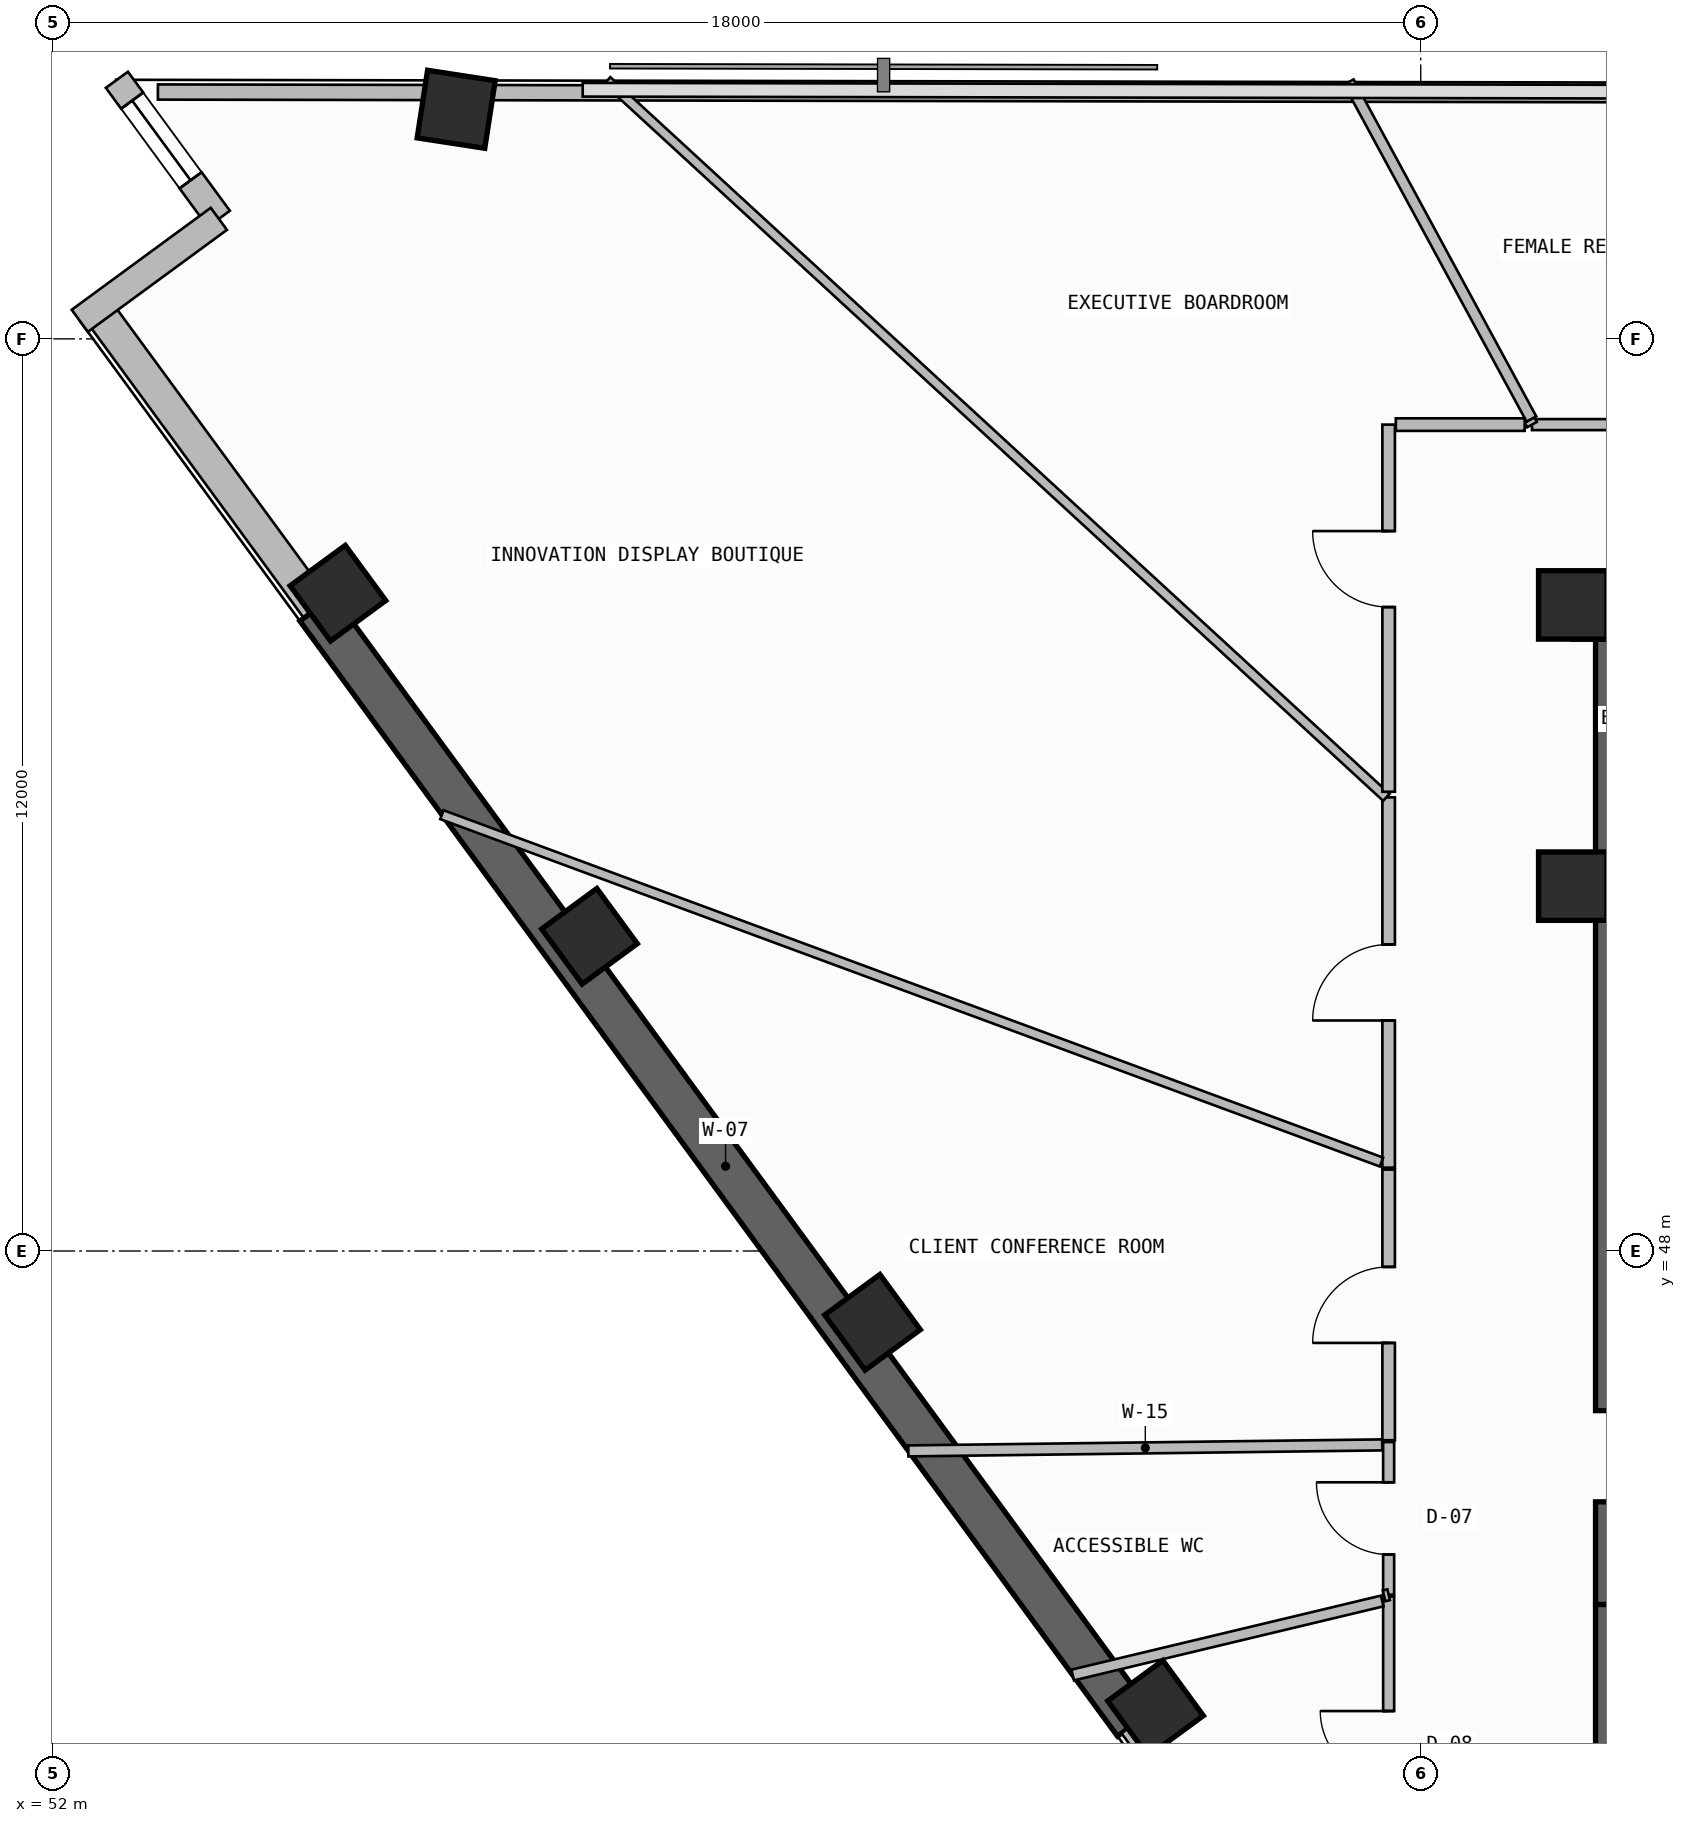
"""IFC4 building model, lengths in metres.
Left out: names, types, materials, properties, quantities, classifications, styles, units other than length and angle.
Written with IfcOpenShell. Run it as: python <this file> out.ifc"""

import sys

from ifc_helpers import new_model, si_unit, direction, frame, frame_2d, origin, origin_2d, place, context, subcontext, project, spatial, rectangle, extrude, element, fill, save


model = new_model("IFC4")
c1 = context("Model", 3, precision=1e-05, world=origin(), true_north=direction((0.0, 1.0)))
c2 = subcontext(c1, "Body", "Model", "MODEL_VIEW")
j1 = project(units=[si_unit("LENGTHUNIT", "METRE"), si_unit("PLANEANGLEUNIT", "RADIAN")], contexts=[c1])
p1 = place(None, origin())
s1 = spatial("IfcSite", under=j1, at=p1, CompositionType="ELEMENT")
p2 = place(p1, origin())
s2 = spatial("IfcBuilding", under=s1, at=p2, CompositionType="ELEMENT")
p3 = place(p2, frame((0.0, 0.0, 239.62)))
s3 = spatial("IfcBuildingStorey", under=s2, at=p3, CompositionType="ELEMENT", Elevation=239.62)
p4 = place(p3, frame((72.6, 35.5, -0.26), z_axis=(0.0, 0.0, 1.0), x_axis=(0.0, 1.0, 0.0)))
e1 = element("IfcWall", 1, at=p4, inside=s3, PredefinedType="SHEAR", context=c2, shape_type="SweptSolid", body=[
    extrude(rectangle(XDim=7.85, YDim=0.6, at=frame_2d((3.925, 0.0))), origin(), (0.0, 0.0, 1.0), 3.52),
])
p5 = place(p4, frame((1.45, 0.0, 0.26)))
e2 = element("IfcOpeningElement", 2, at=p5, cuts=e1, PredefinedType="OPENING", context=c2, shape_type="SweptSolid", body=[
    extrude(rectangle(XDim=1.2, YDim=2.2, at=frame_2d((0.6, 1.1))), frame((0.0, 0.31, 0.0), z_axis=(0.0, -1.0, 0.0), x_axis=(1.0, 0.0, 0.0)), (0.0, 0.0, 1.0), 0.62),
])
p6 = place(p3, frame((72.6, 43.35, -0.26), z_axis=(0.0, 0.0, 1.0), x_axis=(0.0, 1.0, 0.0)))
e3 = element("IfcWall", 3, at=p6, inside=s3, PredefinedType="SHEAR", context=c2, shape_type="SweptSolid", body=[
    extrude(rectangle(XDim=12.7, YDim=0.6, at=frame_2d((6.35, 0.0))), origin(), (0.0, 0.0, 1.0), 3.52),
])
p7 = place(p6, frame((1.35, 0.0, 0.26)))
e4 = element("IfcOpeningElement", 4, at=p7, cuts=e3, PredefinedType="OPENING", context=c2, shape_type="SweptSolid", body=[
    extrude(rectangle(XDim=1.2, YDim=2.2, at=frame_2d((0.6, 1.1))), frame((0.0, 0.31, 0.0), z_axis=(0.0, -1.0, 0.0), x_axis=(1.0, 0.0, 0.0)), (0.0, 0.0, 1.0), 0.62),
])
p8 = place(p3, frame((72.0, 56.35, -0.26), z_axis=(0.0, 0.0, 1.0), x_axis=(1.0, 0.0, 0.0)))
e5 = element("IfcWall", 5, at=p8, inside=s3, PredefinedType="SHEAR", context=c2, shape_type="SweptSolid", body=[
    extrude(rectangle(XDim=13.6, YDim=0.6, at=frame_2d((6.8, 0.0))), origin(), (0.0, 0.0, 1.0), 3.52),
])
for number, where, z_axis, x_axis in (
    (6, (72.0, 52.8, 0.0), (0.0, 0.0, 1.0), (1.0, 0.0, 0.0)),
    (7, (72.0, 56.5, 0.0), (0.0, 0.0, 1.0), (1.0, 0.0, 0.0)),
    (8, (57.309, 63.021, 0.0), (0.0, 0.0, 1.0), (0.152, 0.988, 0.0)),
    (9, (55.753, 56.654, 0.0), (0.0, 0.0, 1.0), (-0.591, 0.806, 0.0)),
    (10, (59.063, 52.14, 0.0), (0.0, 0.0, 1.0), (-0.591, 0.806, 0.0)),
    (11, (62.787, 47.062, 0.0), (0.0, 0.0, 1.0), (-0.591, 0.806, 0.0)),
    (12, (66.51, 41.983, 0.0), (0.0, 0.0, 1.0), (-0.591, 0.806, 0.0)),
):
    element("IfcColumn", number, at=place(p3, frame(where, z_axis=z_axis, x_axis=x_axis)), inside=s3, PredefinedType="COLUMN", context=c2, shape_type="SweptSolid", body=[
        extrude(rectangle(XDim=0.9, YDim=0.9, at=origin_2d()), origin(), (0.0, 0.0, 1.0), 3.52),
    ])
p9 = place(p3, frame((52.579, 60.4, 0.0), z_axis=(0.0, 0.0, 1.0), x_axis=(0.591311800505, -0.806443026248, 0.0)))
e13 = element("IfcWall", 13, at=p9, inside=s3, PredefinedType="SOLIDWALL", context=c2, shape_type="SweptSolid", body=[
    extrude(rectangle(XDim=4.898, YDim=0.42, at=frame_2d((2.449, 0.0))), origin(), (0.0, 0.0, 1.0), 2.645),
])
p10 = place(p3, frame((55.475, 56.45, -0.26), z_axis=(0.0, 0.0, 1.0), x_axis=(0.591309555876, -0.806444672082, 0.0)))
e14 = element("IfcWall", 14, at=p10, inside=s3, PredefinedType="SHEAR", context=c2, shape_type="SweptSolid", body=[
    extrude(rectangle(XDim=18.192, YDim=0.55, at=frame_2d((9.096, 0.0))), origin(), (0.0, 0.0, 1.0), 3.52),
])
p11 = place(p3, frame((66.232, 41.779, 0.0), z_axis=(0.0, 0.0, 1.0), x_axis=(0.591309008949, -0.806445073105, 0.0)))
e15 = element("IfcWall", 15, at=p11, inside=s3, PredefinedType="SOLIDWALL", context=c2, shape_type="SweptSolid", body=[
    extrude(rectangle(XDim=8.908, YDim=0.42, at=frame_2d((4.454, 0.0))), origin(), (0.0, 0.0, 1.0), 2.645),
])
p12 = place(p11, frame((2.149, 0.0, 1.1)))
e16 = element("IfcOpeningElement", 16, at=p12, cuts=e15, PredefinedType="OPENING", context=c2, shape_type="SweptSolid", body=[
    extrude(rectangle(XDim=2.4, YDim=1.2, at=frame_2d((1.2, 0.6))), frame((0.0, 0.22, 0.0), z_axis=(0.0, -1.0, 0.0), x_axis=(1.0, 0.0, 0.0)), (0.0, 0.0, 1.0), 0.44),
])
p13 = place(p3, frame((52.845, 63.409, 0.0), z_axis=(0.0, 0.0, 1.0), x_axis=(0.591251685745, -0.806487101015, 0.0)))
e17 = element("IfcWall", 17, at=p13, inside=s3, PredefinedType="SOLIDWALL", context=c2, shape_type="SweptSolid", body=[
    extrude(rectangle(XDim=2.269, YDim=0.36, at=frame_2d((1.134, 0.0))), origin(), (0.0, 0.0, 1.0), 3.26),
])
p14 = place(p13, frame((0.34, 0.0, 0.45)))
e18 = element("IfcOpeningElement", 18, at=p14, cuts=e17, PredefinedType="OPENING", context=c2, shape_type="SweptSolid", body=[
    extrude(rectangle(XDim=1.3, YDim=2.4, at=frame_2d((0.65, 1.2))), frame((0.0, 0.19, 0.0), z_axis=(0.0, -1.0, 0.0), x_axis=(1.0, 0.0, 0.0)), (0.0, 0.0, 1.0), 0.38),
])
p15 = place(p3, frame((54.187, 61.579, 0.0), z_axis=(0.0, 0.0, 1.0), x_axis=(-0.806449475274, -0.591303005092, 0.0)))
e19 = element("IfcWall", 19, at=p15, inside=s3, PredefinedType="SOLIDWALL", context=c2, shape_type="SweptSolid", body=[
    extrude(rectangle(XDim=2.268, YDim=0.36, at=frame_2d((1.134, 0.0))), origin(), (0.0, 0.0, 1.0), 3.26),
])
p16 = place(p3, frame((83.332, 63.193, 0.0), z_axis=(0.0, 0.0, 1.0), x_axis=(-0.999998363757, 0.001809000383, 0.0)))
e20 = element("IfcWall", 20, at=p16, inside=s3, PredefinedType="PARAPET", context=c2, shape_type="SweptSolid", body=[
    extrude(rectangle(XDim=25.777, YDim=0.2, at=frame_2d((12.889, 0.0))), origin(), (0.0, 0.0, 1.0), 1.15),
])
p17 = place(p3, frame((57.064, 63.241, 0.0), z_axis=(0.0, 0.0, 1.0), x_axis=(-0.999998274159, 0.001857869529, 0.0)))
e21 = element("IfcWall", 21, at=p17, inside=s3, PredefinedType="PARAPET", context=c2, shape_type="SweptSolid", body=[
    extrude(rectangle(XDim=3.679, YDim=0.2, at=frame_2d((1.84, 0.0))), origin(), (0.0, 0.0, 1.0), 1.15),
])
p18 = place(p3, frame((69.578, 43.453, 0.0), z_axis=(0.0, 0.0, 1.0), x_axis=(0.0, -1.0, 0.0)))
e22 = element("IfcWall", 22, at=p18, inside=s3, PredefinedType="PARTITIONING", context=c2, shape_type="SweptSolid", body=[
    extrude(rectangle(XDim=3.911, YDim=0.145, at=frame_2d((1.956, 0.0))), origin(), (0.0, 0.0, 1.0), 3.26),
])
p19 = place(p18, frame((1.506, 0.0, 0.0)))
e23 = element("IfcOpeningElement", 23, at=p19, cuts=e22, PredefinedType="OPENING", context=c2, shape_type="SweptSolid", body=[
    extrude(rectangle(XDim=0.9, YDim=2.1, at=frame_2d((0.45, 1.05))), frame((0.0, 0.083, 0.0), z_axis=(0.0, -1.0, 0.0), x_axis=(1.0, 0.0, 0.0)), (0.0, 0.0, 1.0), 0.165),
])
p20 = place(p3, frame((65.421, 42.421, 0.0), z_axis=(0.0, 0.0, 1.0), x_axis=(0.972554805583, 0.232673913744, 0.0)))
e24 = element("IfcWall", 24, at=p20, inside=s3, PredefinedType="PARTITIONING", context=c2, shape_type="SweptSolid", body=[
    extrude(rectangle(XDim=4.188, YDim=0.145, at=frame_2d((2.094, 0.0))), origin(), (0.0, 0.0, 1.0), 2.645),
])
p21 = place(p3, frame((69.578, 45.486, 0.0), z_axis=(0.0, 0.0, 1.0), x_axis=(0.0, -1.0, 0.0)))
e25 = element("IfcWall", 25, at=p21, inside=s3, PredefinedType="PARTITIONING", context=c2, shape_type="SweptSolid", body=[
    extrude(rectangle(XDim=2.009, YDim=0.145, at=frame_2d((1.004, 0.0))), origin(), (0.0, 0.0, 1.0), 3.26),
])
p22 = place(p21, frame((0.529, 0.0, 0.0)))
e26 = element("IfcOpeningElement", 26, at=p22, cuts=e25, PredefinedType="OPENING", context=c2, shape_type="SweptSolid", body=[
    extrude(rectangle(XDim=0.95, YDim=2.15, at=frame_2d((0.475, 1.075))), frame((0.0, 0.083, 0.0), z_axis=(0.0, -1.0, 0.0), x_axis=(1.0, 0.0, 0.0)), (0.0, 0.0, 1.0), 0.165),
])
p23 = place(p3, frame((69.578, 43.478, 0.0), z_axis=(0.0, 0.0, 1.0), x_axis=(-0.974190578374, -0.225727085233, 0.0)))
e27 = element("IfcWall", 27, at=p23, inside=s3, PredefinedType="PARTITIONING", context=c2, shape_type="SweptSolid", body=[
    extrude(rectangle(XDim=0.062, YDim=0.145, at=frame_2d((0.031, 0.0))), origin(), (0.0, 0.0, 1.0), 3.26),
])
p24 = place(p3, frame((63.259, 45.37, 0.0), z_axis=(0.0, 0.0, 1.0), x_axis=(0.999919530031, 0.01268595535, 0.0)))
e28 = element("IfcWall", 28, at=p24, inside=s3, PredefinedType="PARTITIONING", context=c2, shape_type="SweptSolid", body=[
    extrude(rectangle(XDim=6.235, YDim=0.145, at=frame_2d((3.118, 0.0))), origin(), (0.0, 0.0, 1.0), 2.645),
])
p25 = place(p3, frame((77.35, 58.872, 0.0), z_axis=(0.0, 0.0, 1.0), x_axis=(-1.0, 0.0, 0.0)))
e29 = element("IfcWall", 29, at=p25, inside=s3, PredefinedType="PARTITIONING", context=c2, shape_type="SweptSolid", body=[
    extrude(rectangle(XDim=5.886, YDim=0.145, at=frame_2d((2.943, 0.0))), origin(), (0.0, 0.0, 1.0), 3.26),
])
p26 = place(p25, frame((1.805, 0.0, 0.0)))
e30 = element("IfcOpeningElement", 30, at=p26, cuts=e29, PredefinedType="OPENING", context=c2, shape_type="SweptSolid", body=[
    extrude(rectangle(XDim=0.9, YDim=2.1, at=frame_2d((0.45, 1.05))), frame((0.0, 0.083, 0.0), z_axis=(0.0, -1.0, 0.0), x_axis=(1.0, 0.0, 0.0)), (0.0, 0.0, 1.0), 0.165),
])
p27 = place(p3, frame((71.464, 58.872, 0.0), z_axis=(0.0, 0.0, 1.0), x_axis=(-0.485339901234, 0.87432555737, 0.0)))
e31 = element("IfcWall", 31, at=p27, inside=s3, PredefinedType="PARTITIONING", context=c2, shape_type="SweptSolid", body=[
    extrude(rectangle(XDim=0.068, YDim=0.145, at=frame_2d((0.034, 0.0))), origin(), (0.0, 0.0, 1.0), 3.26),
])
p28 = place(p3, frame((71.456, 58.946, 0.0), z_axis=(0.0, 0.0, 1.0), x_axis=(-0.476543617449, 0.879150829305, 0.0)))
e32 = element("IfcWall", 32, at=p28, inside=s3, PredefinedType="PARTITIONING", context=c2, shape_type="SweptSolid", body=[
    extrude(rectangle(XDim=5.042, YDim=0.145, at=frame_2d((2.521, 0.0))), origin(), (0.0, 0.0, 1.0), 3.26),
])
p29 = place(p3, frame((69.578, 53.968, 0.0), z_axis=(0.0, 0.0, 1.0), x_axis=(0.0, -1.0, 0.0)))
e33 = element("IfcWall", 33, at=p29, inside=s3, PredefinedType="PARTITIONING", context=c2, shape_type="SweptSolid", body=[
    extrude(rectangle(XDim=4.872, YDim=0.165, at=frame_2d((2.436, 0.0))), origin(), (0.0, 0.0, 1.0), 2.745),
])
p30 = place(p29, frame((1.936, 0.0, 0.0)))
e34 = element("IfcOpeningElement", 34, at=p30, cuts=e33, PredefinedType="OPENING", context=c2, shape_type="SweptSolid", body=[
    extrude(rectangle(XDim=1.0, YDim=2.2, at=frame_2d((0.5, 1.1))), frame((0.0, 0.093, 0.0), z_axis=(0.0, -1.0, 0.0), x_axis=(1.0, 0.0, 0.0)), (0.0, 0.0, 1.0), 0.185),
])
p31 = place(p3, frame((59.295, 63.397, 0.0), z_axis=(0.0, 0.0, 1.0), x_axis=(0.736065490845, -0.676910328764, 0.0)))
e35 = element("IfcWall", 35, at=p31, inside=s3, PredefinedType="PARTITIONING", context=c2, shape_type="SweptSolid", body=[
    extrude(rectangle(XDim=13.929, YDim=0.125, at=frame_2d((6.964, 0.0))), origin(), (0.0, 0.0, 1.0), 2.745),
])
p32 = place(p3, frame((69.483, 49.17, 0.0), z_axis=(0.0, 0.0, 1.0), x_axis=(-0.93795796186, 0.346748989593, 0.0)))
e36 = element("IfcWall", 36, at=p32, inside=s3, PredefinedType="PARTITIONING", context=c2, shape_type="SweptSolid", body=[
    extrude(rectangle(XDim=13.18, YDim=0.125, at=frame_2d((6.59, 0.0))), origin(), (0.0, 0.0, 1.0), 2.645),
])
p33 = place(p3, frame((69.578, 58.872, 0.0), z_axis=(0.0, 0.0, 1.0), x_axis=(0.0, -1.0, 0.0)))
e37 = element("IfcWall", 37, at=p33, inside=s3, PredefinedType="PARTITIONING", context=c2, shape_type="SweptSolid", body=[
    extrude(rectangle(XDim=4.83, YDim=0.165, at=frame_2d((2.415, 0.0))), origin(), (0.0, 0.0, 1.0), 2.745),
])
p34 = place(p33, frame((1.401, 0.0, 0.0)))
e38 = element("IfcOpeningElement", 38, at=p34, cuts=e37, PredefinedType="OPENING", context=c2, shape_type="SweptSolid", body=[
    extrude(rectangle(XDim=1.0, YDim=2.2, at=frame_2d((0.5, 1.1))), frame((0.0, 0.093, 0.0), z_axis=(0.0, -1.0, 0.0), x_axis=(1.0, 0.0, 0.0)), (0.0, 0.0, 1.0), 0.185),
])
p35 = place(p3, frame((71.367, 58.872, 0.0), z_axis=(0.0, 0.0, 1.0), x_axis=(-1.0, 0.0, 0.0)))
e39 = element("IfcWall", 39, at=p35, inside=s3, PredefinedType="PARTITIONING", context=c2, shape_type="SweptSolid", body=[
    extrude(rectangle(XDim=1.695, YDim=0.165, at=frame_2d((0.847, 0.0))), origin(), (0.0, 0.0, 1.0), 3.26),
])
p36 = place(p3, frame((69.578, 49.071, 0.0), z_axis=(0.0, 0.0, 1.0), x_axis=(0.0, -1.0, 0.0)))
e40 = element("IfcWall", 40, at=p36, inside=s3, PredefinedType="PARTITIONING", context=c2, shape_type="SweptSolid", body=[
    extrude(rectangle(XDim=3.561, YDim=0.165, at=frame_2d((1.78, 0.0))), origin(), (0.0, 0.0, 1.0), 3.26),
])
p37 = place(p36, frame((1.281, 0.0, 0.0)))
e41 = element("IfcOpeningElement", 41, at=p37, cuts=e40, PredefinedType="OPENING", context=c2, shape_type="SweptSolid", body=[
    extrude(rectangle(XDim=1.0, YDim=2.2, at=frame_2d((0.5, 1.1))), frame((0.0, 0.093, 0.0), z_axis=(0.0, -1.0, 0.0), x_axis=(1.0, 0.0, 0.0)), (0.0, 0.0, 1.0), 0.185),
])
p38 = place(p14, origin())
e42 = element("IfcWindow", 42, at=p38, inside=s3, PartitioningType="SINGLE_PANEL", PredefinedType="WINDOW", context=c2, shape_type="SweptSolid", body=[
    extrude(rectangle(XDim=1.3, YDim=2.4, at=frame_2d((0.65, 1.2))), frame((0.0, 0.03, 0.0), z_axis=(0.0, -1.0, 0.0), x_axis=(1.0, 0.0, 0.0)), (0.0, 0.0, 1.0), 0.06),
])
fill(e18, e42)
p39 = place(p19, frame((0.9, 0.0, 0.0), z_axis=(0.0, 0.0, 1.0), x_axis=(-1.0, 0.0, 0.0)))
e43 = element("IfcDoor", 43, at=p39, inside=s3, OperationType="SINGLE_SWING_RIGHT", PredefinedType="DOOR", context=c2, shape_type="SweptSolid", body=[
    extrude(rectangle(XDim=0.9, YDim=2.1, at=frame_2d((0.45, 1.05))), frame((0.0, 0.025, 0.0), z_axis=(0.0, -1.0, 0.0), x_axis=(1.0, 0.0, 0.0)), (0.0, 0.0, 1.0), 0.05),
])
fill(e23, e43)
p40 = place(p22, frame((0.95, 0.0, 0.0), z_axis=(0.0, 0.0, 1.0), x_axis=(-1.0, 0.0, 0.0)))
e44 = element("IfcDoor", 44, at=p40, inside=s3, OperationType="SINGLE_SWING_RIGHT", PredefinedType="DOOR", context=c2, shape_type="SweptSolid", body=[
    extrude(rectangle(XDim=0.95, YDim=2.15, at=frame_2d((0.475, 1.075))), frame((0.0, 0.025, 0.0), z_axis=(0.0, -1.0, 0.0), x_axis=(1.0, 0.0, 0.0)), (0.0, 0.0, 1.0), 0.05),
])
fill(e26, e44)
p41 = place(p30, frame((1.0, 0.0, 0.0), z_axis=(0.0, 0.0, 1.0), x_axis=(-1.0, 0.0, 0.0)))
e45 = element("IfcDoor", 45, at=p41, inside=s3, OperationType="SINGLE_SWING_LEFT", PredefinedType="DOOR", context=c2, shape_type="SweptSolid", body=[
    extrude(rectangle(XDim=1.0, YDim=2.2, at=frame_2d((0.5, 1.1))), frame((0.0, 0.025, 0.0), z_axis=(0.0, -1.0, 0.0), x_axis=(1.0, 0.0, 0.0)), (0.0, 0.0, 1.0), 0.05),
])
fill(e34, e45)
p42 = place(p34, frame((1.0, 0.0, 0.0), z_axis=(0.0, 0.0, 1.0), x_axis=(-1.0, 0.0, 0.0)))
e46 = element("IfcDoor", 46, at=p42, inside=s3, OperationType="SINGLE_SWING_RIGHT", PredefinedType="DOOR", context=c2, shape_type="SweptSolid", body=[
    extrude(rectangle(XDim=1.0, YDim=2.2, at=frame_2d((0.5, 1.1))), frame((0.0, 0.025, 0.0), z_axis=(0.0, -1.0, 0.0), x_axis=(1.0, 0.0, 0.0)), (0.0, 0.0, 1.0), 0.05),
])
fill(e38, e46)
p43 = place(p37, frame((1.0, 0.0, 0.0), z_axis=(0.0, 0.0, 1.0), x_axis=(-1.0, 0.0, 0.0)))
e47 = element("IfcDoor", 47, at=p43, inside=s3, OperationType="SINGLE_SWING_LEFT", PredefinedType="DOOR", context=c2, shape_type="SweptSolid", body=[
    extrude(rectangle(XDim=1.0, YDim=2.2, at=frame_2d((0.5, 1.1))), frame((0.0, 0.025, 0.0), z_axis=(0.0, -1.0, 0.0), x_axis=(1.0, 0.0, 0.0)), (0.0, 0.0, 1.0), 0.05),
])
fill(e41, e47)
save(model, sys.argv[1])
